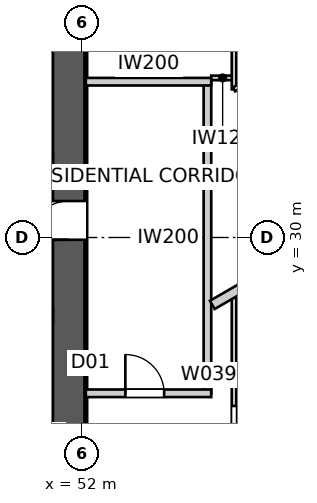
"""IFC4 building model, lengths in metres.
Left out: names, types, materials, properties, quantities, classifications, styles, units other than length and angle.
Written with IfcOpenShell. Run it as: python <this file> out.ifc"""

import sys

from ifc_helpers import new_model, si_unit, direction, frame, frame_2d, origin, place, context, subcontext, project, spatial, polyline, rectangle, outline, extrude, element, fill, save


model = new_model("IFC4")
c1 = context("Model", 3, precision=1e-05, world=origin(), true_north=direction((0.0, 1.0)))
c2 = subcontext(c1, "Body", "Model", "MODEL_VIEW")
j1 = project(units=[si_unit("LENGTHUNIT", "METRE"), si_unit("PLANEANGLEUNIT", "RADIAN")], contexts=[c1])
p1 = place(None, origin())
s1 = spatial("IfcSite", under=j1, at=p1, CompositionType="ELEMENT")
p2 = place(p1, origin())
s2 = spatial("IfcBuilding", under=s1, at=p2, CompositionType="ELEMENT")
p3 = place(p2, frame((0.0, 0.0, 225.2)))
s3 = spatial("IfcBuildingStorey", under=s2, at=p3, CompositionType="ELEMENT", Elevation=225.2)
p4 = place(p3, frame((51.65, 18.8, 0.0), z_axis=(0.0, 0.0, 1.0), x_axis=(0.0, 1.0, 0.0)))
e1 = element("IfcWall", 1, at=p4, inside=s3, PredefinedType="SHEAR", context=c2, shape_type="SweptSolid", body=[
    extrude(outline(polyline([(0.0, -0.45), (22.4, -0.45), (22.4, -0.025), (22.85, -0.025), (22.85, 0.025), (22.4, 0.025), (22.4, 0.45), (0.0, 0.45), (0.0, 0.025), (-0.45, 0.025), (-0.45, -0.025), (0.0, -0.025), (0.0, -0.45)])), origin(), (0.0, 0.0, 1.0), 3.4),
])
p5 = place(p4, frame((11.14, 0.0, 0.0)))
e2 = element("IfcOpeningElement", 2, at=p5, cuts=e1, PredefinedType="OPENING", context=c2, shape_type="SweptSolid", body=[
    extrude(rectangle(XDim=1.02, YDim=2.4, at=frame_2d((0.51, 1.2))), frame((0.0, 0.46, 0.0), z_axis=(0.0, -1.0, 0.0), x_axis=(1.0, 0.0, 0.0)), (0.0, 0.0, 1.0), 0.92),
])
p6 = place(p3, frame((55.3, 25.9, 0.0), z_axis=(0.0, 0.0, 1.0), x_axis=(0.0, 1.0, 0.0)))
e3 = element("IfcWall", 3, at=p6, inside=s3, PredefinedType="PARTITIONING", context=c2, shape_type="SweptSolid", body=[
    extrude(rectangle(XDim=8.2, YDim=0.2, at=frame_2d((4.1, 0.0))), origin(), (0.0, 0.0, 1.0), 3.25),
])
p7 = place(p3, frame((52.1, 34.1, 0.0), z_axis=(0.0, 0.0, 1.0), x_axis=(1.0, 0.0, 0.0)))
e4 = element("IfcWall", 4, at=p7, inside=s3, PredefinedType="PARTITIONING", context=c2, shape_type="SweptSolid", body=[
    extrude(rectangle(XDim=3.3, YDim=0.2, at=frame_2d((1.65, 0.0))), origin(), (0.0, 0.0, 1.0), 3.25),
])
p8 = place(p3, frame((52.1, 25.9, 0.0), z_axis=(0.0, 0.0, 1.0), x_axis=(1.0, 0.0, 0.0)))
e5 = element("IfcWall", 5, at=p8, inside=s3, PredefinedType="PARTITIONING", context=c2, shape_type="SweptSolid", body=[
    extrude(rectangle(XDim=3.3, YDim=0.2, at=frame_2d((1.65, 0.0))), origin(), (0.0, 0.0, 1.0), 3.25),
])
p9 = place(p8, frame((1.04, 0.0, 0.0)))
e6 = element("IfcOpeningElement", 6, at=p9, cuts=e5, PredefinedType="OPENING", context=c2, shape_type="SweptSolid", body=[
    extrude(rectangle(XDim=1.02, YDim=2.34, at=frame_2d((0.51, 1.17))), frame((0.0, 0.11, 0.0), z_axis=(0.0, -1.0, 0.0), x_axis=(1.0, 0.0, 0.0)), (0.0, 0.0, 1.0), 0.22),
])
p10 = place(p3, frame((64.111, 33.239, 0.0), z_axis=(0.0, 0.0, 1.0), x_axis=(-0.866024190901, -0.50000210077, 0.0)))
e7 = element("IfcWall", 7, at=p10, inside=s3, PredefinedType="PARTITIONING", context=c2, shape_type="SweptSolid", body=[
    extrude(rectangle(XDim=10.026, YDim=0.25, at=frame_2d((5.013, 0.0))), origin(), (0.0, 0.0, 1.0), 3.25),
])
p11 = place(p10, frame((2.229, 0.0, 0.0)))
e8 = element("IfcOpeningElement", 8, at=p11, cuts=e7, PredefinedType="OPENING", context=c2, shape_type="SweptSolid", body=[
    extrude(rectangle(XDim=0.92, YDim=2.34, at=frame_2d((0.46, 1.17))), frame((0.0, 0.135, 0.0), z_axis=(0.0, -1.0, 0.0), x_axis=(1.0, 0.0, 0.0)), (0.0, 0.0, 1.0), 0.27),
])
p12 = place(p3, frame((56.0, 28.557, 0.0), z_axis=(0.0, 0.0, 1.0), x_axis=(0.0, -1.0, 0.0)))
e9 = element("IfcWall", 9, at=p12, inside=s3, PredefinedType="PARTITIONING", context=c2, shape_type="SweptSolid", body=[
    extrude(rectangle(XDim=10.601, YDim=0.12, at=frame_2d((5.3, 0.0))), origin(), (0.0, 0.0, 1.0), 2.55),
])
p13 = place(p12, frame((2.989, 0.0, 0.0)))
e10 = element("IfcOpeningElement", 10, at=p13, cuts=e9, PredefinedType="OPENING", context=c2, shape_type="SweptSolid", body=[
    extrude(rectangle(XDim=0.92, YDim=2.34, at=frame_2d((0.46, 1.17))), frame((0.0, 0.07, 0.0), z_axis=(0.0, -1.0, 0.0), x_axis=(1.0, 0.0, 0.0)), (0.0, 0.0, 1.0), 0.14),
])
p14 = place(p3, frame((56.0, 23.216, 0.0), z_axis=(0.0, 0.0, 1.0), x_axis=(0.866023917076, 0.500002575046, 0.0)))
e11 = element("IfcWall", 11, at=p14, inside=s3, PredefinedType="PARTITIONING", context=c2, shape_type="SweptSolid", body=[
    extrude(rectangle(XDim=11.996, YDim=0.12, at=frame_2d((5.998, 0.0))), origin(), (0.0, 0.0, 1.0), 3.25),
])
p15 = place(p14, frame((4.574, 0.0, 0.0)))
e12 = element("IfcOpeningElement", 12, at=p15, cuts=e11, PredefinedType="OPENING", context=c2, shape_type="SweptSolid", body=[
    extrude(rectangle(XDim=0.92, YDim=2.34, at=frame_2d((0.46, 1.17))), frame((0.0, 0.07, 0.0), z_axis=(0.0, -1.0, 0.0), x_axis=(1.0, 0.0, 0.0)), (0.0, 0.0, 1.0), 0.14),
])
p16 = place(p14, frame((1.02, 0.0, 0.0)))
e13 = element("IfcOpeningElement", 13, at=p16, cuts=e11, PredefinedType="OPENING", context=c2, shape_type="SweptSolid", body=[
    extrude(rectangle(XDim=0.92, YDim=2.34, at=frame_2d((0.46, 1.17))), frame((0.0, 0.07, 0.0), z_axis=(0.0, -1.0, 0.0), x_axis=(1.0, 0.0, 0.0)), (0.0, 0.0, 1.0), 0.14),
])
p17 = place(p14, frame((9.394, 0.0, 0.0)))
e14 = element("IfcOpeningElement", 14, at=p17, cuts=e11, PredefinedType="OPENING", context=c2, shape_type="SweptSolid", body=[
    extrude(rectangle(XDim=0.92, YDim=2.34, at=frame_2d((0.46, 1.17))), frame((0.0, 0.07, 0.0), z_axis=(0.0, -1.0, 0.0), x_axis=(1.0, 0.0, 0.0)), (0.0, 0.0, 1.0), 0.14),
])
p18 = place(p3, frame((56.0, 34.2, 0.0), z_axis=(0.0, 0.0, 1.0), x_axis=(-1.0, 0.0, 0.0)))
e15 = element("IfcWall", 15, at=p18, inside=s3, PredefinedType="PARTITIONING", context=c2, shape_type="SweptSolid", body=[
    extrude(rectangle(XDim=0.6, YDim=0.12, at=frame_2d((0.3, 0.0))), origin(), (0.0, 0.0, 1.0), 3.25),
])
p19 = place(p3, frame((56.0, 44.578, 0.0), z_axis=(0.0, 0.0, 1.0), x_axis=(0.0, -1.0, 0.0)))
e16 = element("IfcWall", 16, at=p19, inside=s3, PredefinedType="PARTITIONING", context=c2, shape_type="SweptSolid", body=[
    extrude(rectangle(XDim=10.681, YDim=0.12, at=frame_2d((5.34, 0.0))), origin(), (0.0, 0.0, 1.0), 2.55),
])
p20 = place(p19, frame((0.77, 0.0, 0.0)))
e17 = element("IfcOpeningElement", 17, at=p20, cuts=e16, PredefinedType="OPENING", context=c2, shape_type="SweptSolid", body=[
    extrude(rectangle(XDim=0.96, YDim=2.1, at=frame_2d((0.48, 1.05))), frame((0.0, 0.07, 0.0), z_axis=(0.0, -1.0, 0.0), x_axis=(1.0, 0.0, 0.0)), (0.0, 0.0, 1.0), 0.14),
])
p21 = place(p19, frame((7.379, 0.0, 0.0)))
e18 = element("IfcOpeningElement", 18, at=p21, cuts=e16, PredefinedType="OPENING", context=c2, shape_type="SweptSolid", body=[
    extrude(rectangle(XDim=0.96, YDim=2.1, at=frame_2d((0.48, 1.05))), frame((0.0, 0.07, 0.0), z_axis=(0.0, -1.0, 0.0), x_axis=(1.0, 0.0, 0.0)), (0.0, 0.0, 1.0), 0.14),
])
p22 = place(p3, frame((56.0, 33.897, 0.0), z_axis=(0.0, 0.0, 1.0), x_axis=(0.866033470286, 0.49998602815, 0.0)))
e19 = element("IfcWall", 19, at=p22, inside=s3, PredefinedType="PARTITIONING", context=c2, shape_type="SweptSolid", body=[
    extrude(rectangle(XDim=6.655, YDim=0.12, at=frame_2d((3.328, 0.0))), origin(), (0.0, 0.0, 1.0), 3.25),
])
p23 = place(p22, frame((2.887, 0.0, 0.0)))
e20 = element("IfcOpeningElement", 20, at=p23, cuts=e19, PredefinedType="OPENING", context=c2, shape_type="SweptSolid", body=[
    extrude(rectangle(XDim=0.92, YDim=2.34, at=frame_2d((0.46, 1.17))), frame((0.0, 0.07, 0.0), z_axis=(0.0, -1.0, 0.0), x_axis=(1.0, 0.0, 0.0)), (0.0, 0.0, 1.0), 0.14),
])
p24 = place(p9, origin())
e21 = element("IfcDoor", 21, at=p24, inside=s3, OperationType="SINGLE_SWING_LEFT", PredefinedType="DOOR", context=c2, shape_type="SweptSolid", body=[
    extrude(rectangle(XDim=1.02, YDim=2.34, at=frame_2d((0.51, 1.17))), frame((0.0, 0.025, 0.0), z_axis=(0.0, -1.0, 0.0), x_axis=(1.0, 0.0, 0.0)), (0.0, 0.0, 1.0), 0.05),
])
fill(e6, e21)
p25 = place(p13, origin())
e22 = element("IfcDoor", 22, at=p25, inside=s3, OperationType="SINGLE_SWING_RIGHT", PredefinedType="DOOR", context=c2, shape_type="SweptSolid", body=[
    extrude(rectangle(XDim=0.92, YDim=2.34, at=frame_2d((0.46, 1.17))), frame((0.0, 0.025, 0.0), z_axis=(0.0, -1.0, 0.0), x_axis=(1.0, 0.0, 0.0)), (0.0, 0.0, 1.0), 0.05),
])
fill(e10, e22)
p26 = place(p5, origin())
e23 = element("IfcDoor", 23, at=p26, inside=s3, OperationType="SINGLE_SWING_LEFT", PredefinedType="DOOR", context=c2, shape_type="SweptSolid", body=[
    extrude(rectangle(XDim=1.02, YDim=2.4, at=frame_2d((0.51, 1.2))), frame((0.0, 0.025, 0.0), z_axis=(0.0, -1.0, 0.0), x_axis=(1.0, 0.0, 0.0)), (0.0, 0.0, 1.0), 0.05),
])
fill(e2, e23)
save(model, sys.argv[1])
